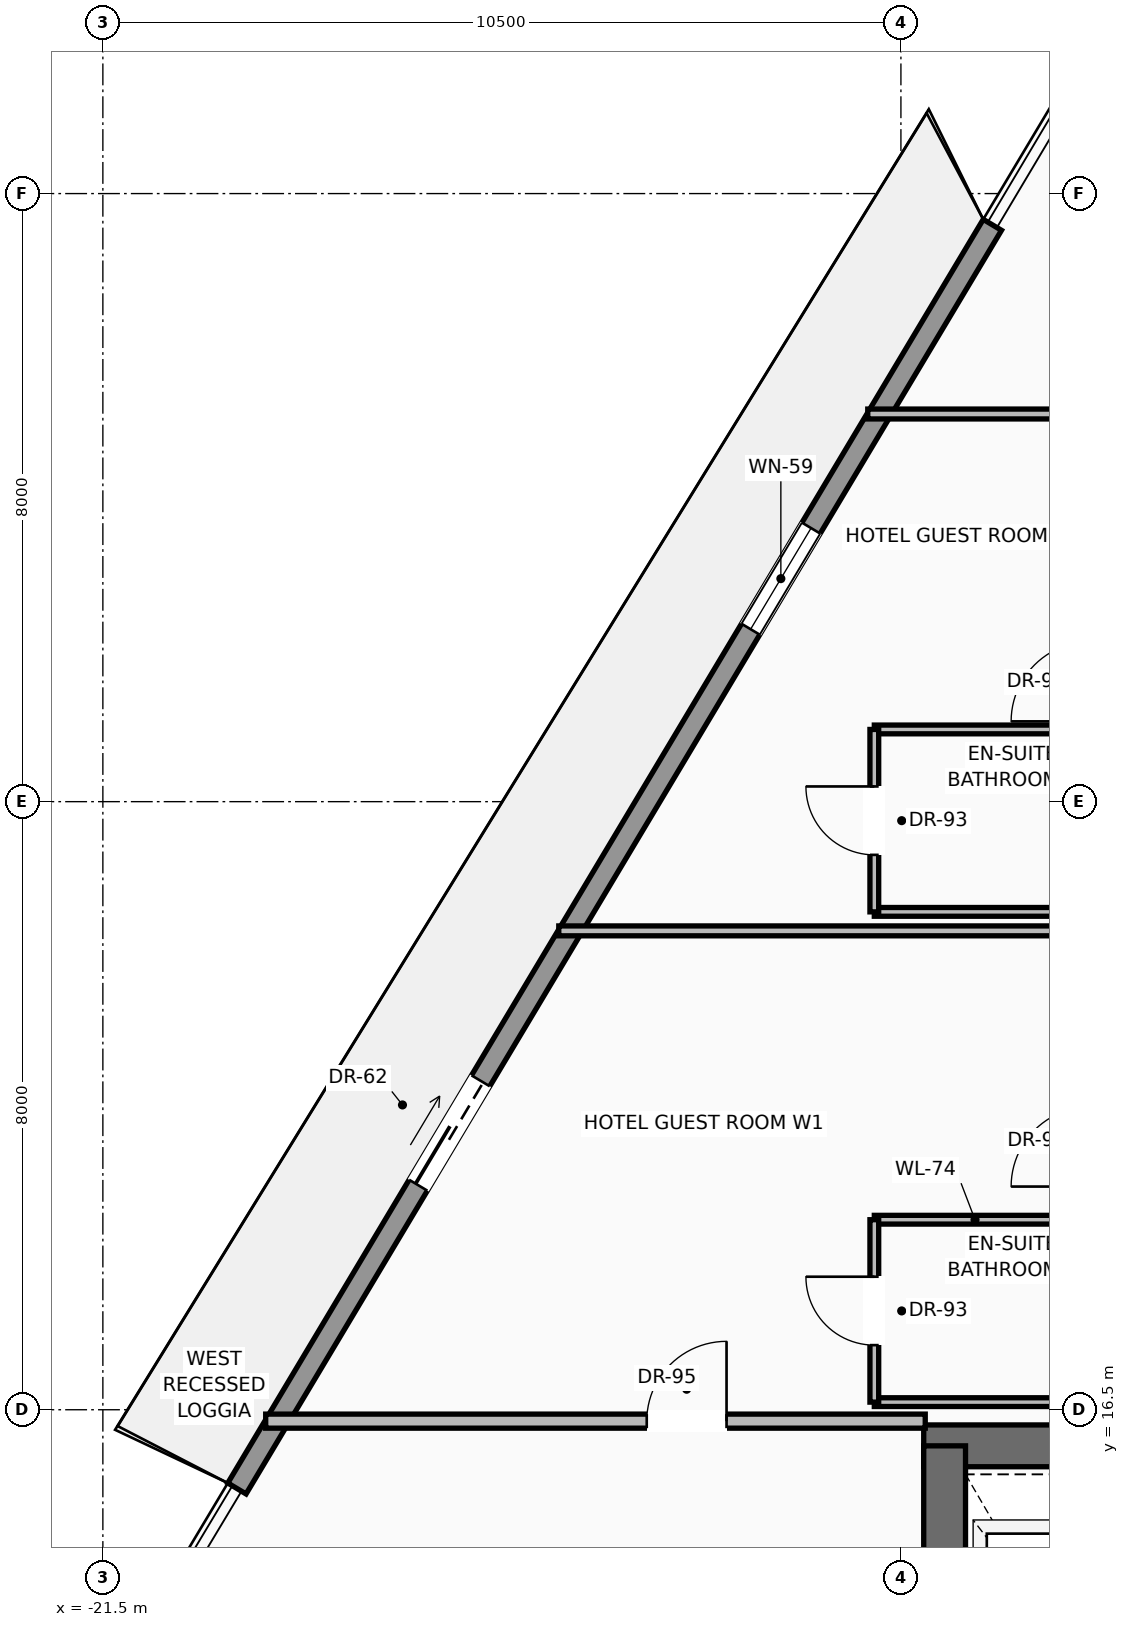
"""IFC4 building model, lengths in metres.
Left out: names, types, materials, properties, quantities, classifications, styles, units other than length and angle.
Written with IfcOpenShell. Run it as: python <this file> out.ifc"""

import sys

from ifc_helpers import new_model, si_unit, direction, frame, frame_2d, origin, place, context, subcontext, project, spatial, rectangle, extrude, source, transform, mapped, element, fill, save


model = new_model("IFC4")
c1 = context("Model", 3, precision=1e-05, world=origin(), true_north=direction((0.0, 1.0)))
c2 = subcontext(c1, "Body", "Model", "MODEL_VIEW")
j1 = project(units=[si_unit("LENGTHUNIT", "METRE"), si_unit("PLANEANGLEUNIT", "RADIAN")], contexts=[c1])
p1 = place(None, origin())
s1 = spatial("IfcSite", under=j1, at=p1, CompositionType="ELEMENT")
p2 = place(p1, origin())
s2 = spatial("IfcBuilding", under=s1, at=p2, CompositionType="ELEMENT")
p3 = place(p2, frame((0.0, 0.0, 223.45)))
s3 = spatial("IfcBuildingStorey", under=s2, at=p3, CompositionType="ELEMENT", Elevation=223.45)
p4 = place(p3, frame((-10.7, 16.025, 0.0), z_axis=(0.0, 0.0, 1.0), x_axis=(1.0, 0.0, 0.0)))
e1 = element("IfcWall", 1, at=p4, inside=s3, PredefinedType="SHEAR", context=c2, shape_type="SweptSolid", body=[
    extrude(rectangle(XDim=21.4, YDim=0.55, at=frame_2d((10.7, 0.0))), origin(), (0.0, 0.0, 1.0), 3.24),
])
p5 = place(p4, frame((3.27, 0.0, 0.0)))
e2 = element("IfcOpeningElement", 2, at=p5, cuts=e1, PredefinedType="OPENING", context=c2, shape_type="SweptSolid", body=[
    extrude(rectangle(XDim=1.3, YDim=2.3, at=frame_2d((0.65, 1.15))), frame((0.0, 0.285, 0.0), z_axis=(0.0, -1.0, 0.0), x_axis=(1.0, 0.0, 0.0)), (0.0, 0.0, 1.0), 0.57),
])
p6 = place(p4, frame((9.7, 0.0, 0.0)))
e3 = element("IfcOpeningElement", 3, at=p6, cuts=e1, PredefinedType="OPENING", context=c2, shape_type="SweptSolid", body=[
    extrude(rectangle(XDim=2.0, YDim=2.4, at=frame_2d((1.0, 1.2))), frame((0.0, 0.285, 0.0), z_axis=(0.0, -1.0, 0.0), x_axis=(1.0, 0.0, 0.0)), (0.0, 0.0, 1.0), 0.57),
])
p7 = place(p3, frame((-10.425, 0.575, 0.0), z_axis=(0.0, 0.0, 1.0), x_axis=(0.0, 1.0, 0.0)))
e4 = element("IfcWall", 4, at=p7, inside=s3, PredefinedType="SHEAR", context=c2, shape_type="SweptSolid", body=[
    extrude(rectangle(XDim=15.45, YDim=0.55, at=frame_2d((7.725, 0.0))), origin(), (0.0, 0.0, 1.0), 3.24),
])
p8 = place(p3, frame((-19.736, 15.464, 0.0), z_axis=(0.0, 0.0, 1.0), x_axis=(0.513136432844, 0.858307055364, 0.0)))
e5 = element("IfcWall", 5, at=p8, inside=s3, PredefinedType="SOLIDWALL", context=c2, shape_type="SweptSolid", body=[
    extrude(rectangle(XDim=19.37, YDim=0.28, at=frame_2d((9.685, 0.0))), origin(), (0.0, 0.0, 1.0), 2.82),
])
p9 = place(p8, frame((4.649, 0.0, 0.0)))
e6 = element("IfcOpeningElement", 6, at=p9, cuts=e5, PredefinedType="OPENING", context=c2, shape_type="SweptSolid", body=[
    extrude(rectangle(XDim=1.6, YDim=2.35, at=frame_2d((0.8, 1.175))), frame((0.0, 0.15, 0.0), z_axis=(0.0, -1.0, 0.0), x_axis=(1.0, 0.0, 0.0)), (0.0, 0.0, 1.0), 0.3),
])
p10 = place(p8, frame((13.171, 0.0, 0.9)))
e7 = element("IfcOpeningElement", 7, at=p10, cuts=e5, PredefinedType="OPENING", context=c2, shape_type="SweptSolid", body=[
    extrude(rectangle(XDim=1.55, YDim=1.75, at=frame_2d((0.775, 0.875))), frame((0.0, 0.15, 0.0), z_axis=(0.0, -1.0, 0.0), x_axis=(1.0, 0.0, 0.0)), (0.0, 0.0, 1.0), 0.3),
])
p11 = place(p3, frame((-19.358, 16.35, 0.0), z_axis=(0.0, 0.0, 1.0), x_axis=(1.0, 0.0, 0.0)))
e8 = element("IfcWall", 8, at=p11, inside=s3, PredefinedType="PARTITIONING", context=c2, shape_type="SweptSolid", body=[
    extrude(rectangle(XDim=8.678, YDim=0.185, at=frame_2d((4.339, 0.0))), origin(), (0.0, 0.0, 1.0), 3.232),
])
p12 = place(p11, frame((5.013, 0.0, 0.0)))
e9 = element("IfcOpeningElement", 9, at=p12, cuts=e8, PredefinedType="OPENING", context=c2, shape_type="SweptSolid", body=[
    extrude(rectangle(XDim=1.05, YDim=2.25, at=frame_2d((0.525, 1.125))), frame((0.0, 0.103, 0.0), z_axis=(0.0, -1.0, 0.0), x_axis=(1.0, 0.0, 0.0)), (0.0, 0.0, 1.0), 0.205),
])
p13 = place(p3, frame((-11.436, 29.6, 0.0), z_axis=(0.0, 0.0, 1.0), x_axis=(1.0, 0.0, 0.0)))
e10 = element("IfcWall", 10, at=p13, inside=s3, PredefinedType="PARTITIONING", context=c2, shape_type="SweptSolid", body=[
    extrude(rectangle(XDim=2.936, YDim=0.13, at=frame_2d((1.468, 0.0))), origin(), (0.0, 0.0, 1.0), 3.232),
])
for number, where, z_axis, x_axis in (
    (11, (-11.35, 16.6, 0.0), (0.0, 0.0, 1.0), (1.0, 0.0, 0.0)),
    (12, (-11.35, 19.0, 0.0), (0.0, 0.0, 1.0), (1.0, 0.0, 0.0)),
):
    element("IfcWall", number, at=place(p3, frame(where, z_axis=z_axis, x_axis=x_axis)), inside=s3, PredefinedType="PARTITIONING", context=c2, shape_type="SweptSolid", body=[
        extrude(rectangle(XDim=2.65, YDim=0.115, at=frame_2d((1.325, 0.0))), origin(), (0.0, 0.0, 1.0), 3.232),
    ])
p14 = place(p3, frame((-11.35, 16.6, 0.0), z_axis=(0.0, 0.0, 1.0), x_axis=(0.0, 1.0, 0.0)))
e13 = element("IfcWall", 13, at=p14, inside=s3, PredefinedType="PARTITIONING", context=c2, shape_type="SweptSolid", body=[
    extrude(rectangle(XDim=2.4, YDim=0.115, at=frame_2d((1.2, 0.0))), origin(), (0.0, 0.0, 1.0), 3.232),
])
p15 = place(p14, frame((0.75, 0.0, 0.0)))
e14 = element("IfcOpeningElement", 14, at=p15, cuts=e13, PredefinedType="OPENING", context=c2, shape_type="SweptSolid", body=[
    extrude(rectangle(XDim=0.9, YDim=2.15, at=frame_2d((0.45, 1.075))), frame((0.0, 0.067, 0.0), z_axis=(0.0, -1.0, 0.0), x_axis=(1.0, 0.0, 0.0)), (0.0, 0.0, 1.0), 0.135),
])
p16 = place(p3, frame((-15.501, 22.8, 0.0), z_axis=(0.0, 0.0, 1.0), x_axis=(1.0, 0.0, 0.0)))
e15 = element("IfcWall", 15, at=p16, inside=s3, PredefinedType="PARTITIONING", context=c2, shape_type="SweptSolid", body=[
    extrude(rectangle(XDim=7.001, YDim=0.13, at=frame_2d((3.501, 0.0))), origin(), (0.0, 0.0, 1.0), 3.232),
])
for number, where, z_axis, x_axis in (
    (16, (-11.35, 23.05, 0.0), (0.0, 0.0, 1.0), (1.0, 0.0, 0.0)),
    (17, (-11.35, 25.45, 0.0), (0.0, 0.0, 1.0), (1.0, 0.0, 0.0)),
):
    element("IfcWall", number, at=place(p3, frame(where, z_axis=z_axis, x_axis=x_axis)), inside=s3, PredefinedType="PARTITIONING", context=c2, shape_type="SweptSolid", body=[
        extrude(rectangle(XDim=2.65, YDim=0.115, at=frame_2d((1.325, 0.0))), origin(), (0.0, 0.0, 1.0), 3.232),
    ])
p17 = place(p3, frame((-11.35, 23.05, 0.0), z_axis=(0.0, 0.0, 1.0), x_axis=(0.0, 1.0, 0.0)))
e18 = element("IfcWall", 18, at=p17, inside=s3, PredefinedType="PARTITIONING", context=c2, shape_type="SweptSolid", body=[
    extrude(rectangle(XDim=2.4, YDim=0.115, at=frame_2d((1.2, 0.0))), origin(), (0.0, 0.0, 1.0), 3.232),
])
p18 = place(p17, frame((0.75, 0.0, 0.0)))
e19 = element("IfcOpeningElement", 19, at=p18, cuts=e18, PredefinedType="OPENING", context=c2, shape_type="SweptSolid", body=[
    extrude(rectangle(XDim=0.9, YDim=2.15, at=frame_2d((0.45, 1.075))), frame((0.0, 0.067, 0.0), z_axis=(0.0, -1.0, 0.0), x_axis=(1.0, 0.0, 0.0)), (0.0, 0.0, 1.0), 0.135),
])
m1 = source(origin(), c2, "Body", "SweptSolid", [
    extrude(rectangle(XDim=1.6, YDim=2.35, at=frame_2d((0.8, 1.175))), frame((0.0, 0.025, 0.0), z_axis=(0.0, -1.0, 0.0), x_axis=(1.0, 0.0, 0.0)), (0.0, 0.0, 1.0), 0.05),
])
p19 = place(p9, origin())
e20 = element("IfcDoor", 20, at=p19, inside=s3, OperationType="SLIDING_TO_LEFT", PredefinedType="DOOR", context=c2, shape_type="MappedRepresentation", body=[
    mapped(m1, transform((0.0, 0.0, 0.0), scale=1.0)),
])
fill(e6, e20)
m2 = source(origin(), c2, "Body", "SweptSolid", [
    extrude(rectangle(XDim=1.55, YDim=1.75, at=frame_2d((0.775, 0.875))), frame((0.0, 0.03, 0.0), z_axis=(0.0, -1.0, 0.0), x_axis=(1.0, 0.0, 0.0)), (0.0, 0.0, 1.0), 0.06),
])
p20 = place(p10, origin())
e21 = element("IfcWindow", 21, at=p20, inside=s3, PartitioningType="SINGLE_PANEL", PredefinedType="WINDOW", context=c2, shape_type="MappedRepresentation", body=[
    mapped(m2, transform((0.0, 0.0, 0.0), scale=1.0)),
])
fill(e7, e21)
m3 = source(origin(), c2, "Body", "SweptSolid", [
    extrude(rectangle(XDim=1.05, YDim=2.25, at=frame_2d((0.525, 1.125))), frame((0.0, 0.025, 0.0), z_axis=(0.0, -1.0, 0.0), x_axis=(1.0, 0.0, 0.0)), (0.0, 0.0, 1.0), 0.05),
])
p21 = place(p12, origin())
e22 = element("IfcDoor", 22, at=p21, inside=s3, OperationType="SINGLE_SWING_RIGHT", PredefinedType="DOOR", context=c2, shape_type="MappedRepresentation", body=[
    mapped(m3, transform((0.0, 0.0, 0.0), scale=1.0)),
])
fill(e9, e22)
m4 = source(origin(), c2, "Body", "SweptSolid", [
    extrude(rectangle(XDim=0.9, YDim=2.15, at=frame_2d((0.45, 1.075))), frame((0.0, 0.025, 0.0), z_axis=(0.0, -1.0, 0.0), x_axis=(1.0, 0.0, 0.0)), (0.0, 0.0, 1.0), 0.05),
])
p22 = place(p15, origin())
e23 = element("IfcDoor", 23, at=p22, inside=s3, OperationType="SINGLE_SWING_RIGHT", PredefinedType="DOOR", context=c2, shape_type="MappedRepresentation", body=[
    mapped(m4, transform((0.0, 0.0, 0.0), scale=1.0)),
])
fill(e14, e23)
p23 = place(p18, origin())
e24 = element("IfcDoor", 24, at=p23, inside=s3, OperationType="SINGLE_SWING_RIGHT", PredefinedType="DOOR", context=c2, shape_type="MappedRepresentation", body=[
    mapped(m4, transform((0.0, 0.0, 0.0), scale=1.0)),
])
fill(e19, e24)
save(model, sys.argv[1])
